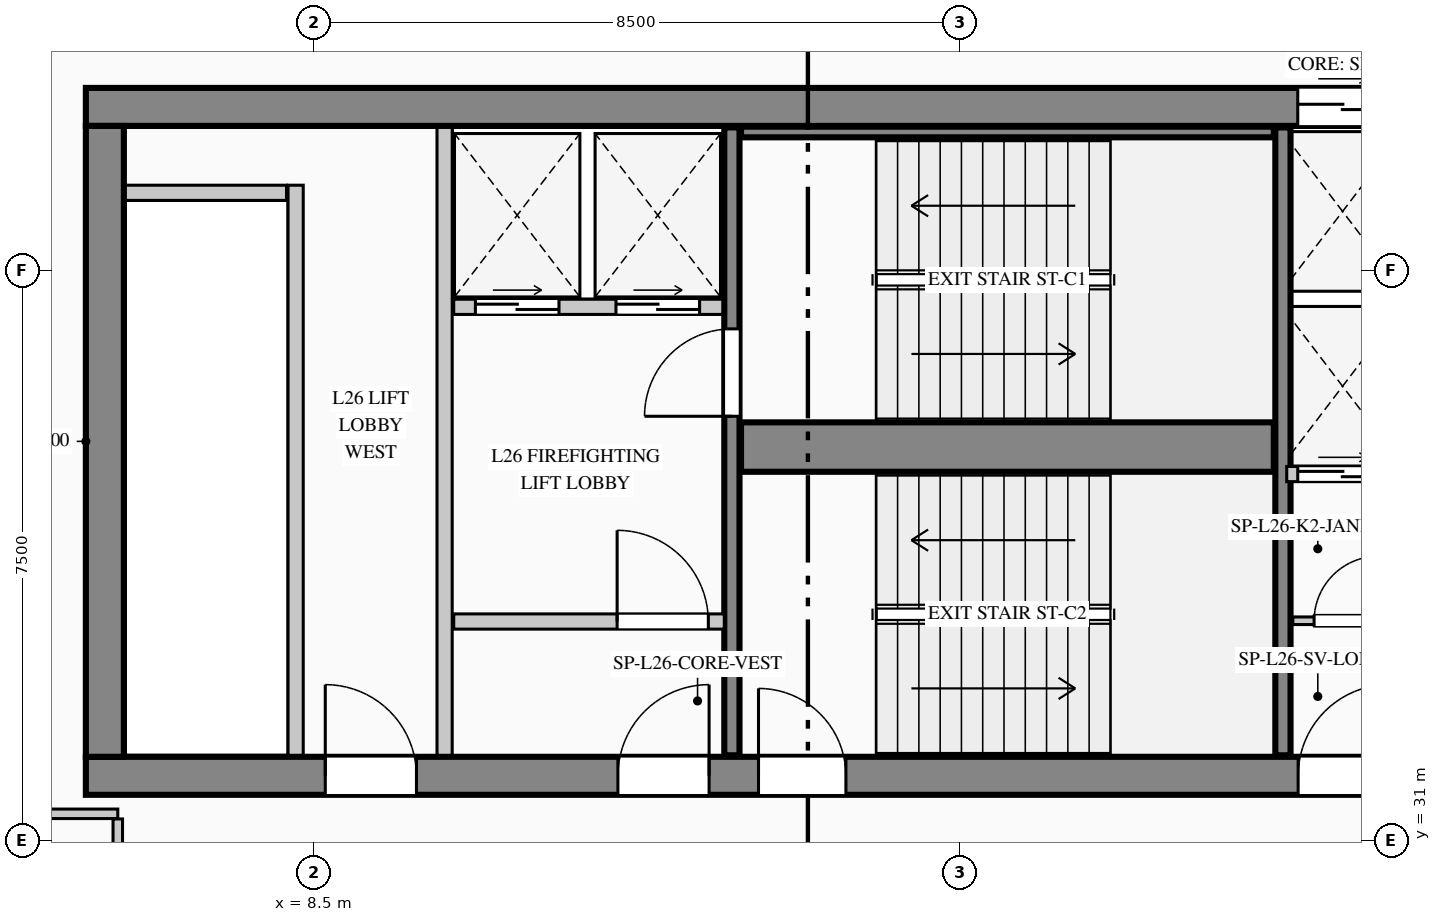
"""IFC4 building model, lengths in metres.
Left out: names, types, materials, properties, quantities, classifications, styles, units other than length and angle.
Written with IfcOpenShell. Run it as: python <this file> out.ifc"""

import sys

from ifc_helpers import new_model, si_unit, direction, frame, frame_2d, origin, place, context, subcontext, project, spatial, rectangle, extrude, element, fill, save


model = new_model("IFC4")
c1 = context("Model", 3, precision=1e-05, world=origin(), true_north=direction((0.0, 1.0)))
c2 = subcontext(c1, "Body", "Model", "MODEL_VIEW")
j1 = project(units=[si_unit("LENGTHUNIT", "METRE"), si_unit("PLANEANGLEUNIT", "RADIAN")], contexts=[c1])
p1 = place(None, origin())
s1 = spatial("IfcSite", under=j1, at=p1, CompositionType="ELEMENT")
p2 = place(p1, origin())
s2 = spatial("IfcBuilding", under=s1, at=p2, CompositionType="ELEMENT")
p3 = place(p2, frame((0.0, 0.0, 115.35)))
s3 = spatial("IfcBuildingStorey", under=s2, at=p3, CompositionType="ELEMENT", Elevation=115.35)
p4 = place(p3, frame((5.5, 40.65, 0.0), z_axis=(0.0, 0.0, 1.0), x_axis=(1.0, 0.0, 0.0)))
e1 = element("IfcWall", 1, at=p4, inside=s3, PredefinedType="SHEAR", context=c2, shape_type="SweptSolid", body=[
    extrude(rectangle(XDim=17.85, YDim=0.5, at=frame_2d((8.925, 0.0))), origin(), (0.0, 0.0, 1.0), 3.95),
])
p5 = place(p4, frame((15.945, 0.0, 0.0)))
e2 = element("IfcOpeningElement", 2, at=p5, cuts=e1, PredefinedType="OPENING", context=c2, shape_type="SweptSolid", body=[
    extrude(rectangle(XDim=1.18, YDim=2.25, at=frame_2d((0.59, 1.125))), frame((0.0, 0.26, 0.0), z_axis=(0.0, -1.0, 0.0), x_axis=(1.0, 0.0, 0.0)), (0.0, 0.0, 1.0), 0.52),
])
p6 = place(p3, frame((5.5, 31.85, 0.0), z_axis=(0.0, 0.0, 1.0), x_axis=(1.0, 0.0, 0.0)))
e3 = element("IfcWall", 3, at=p6, inside=s3, PredefinedType="SHEAR", context=c2, shape_type="SweptSolid", body=[
    extrude(rectangle(XDim=17.85, YDim=0.5, at=frame_2d((8.925, 0.0))), origin(), (0.0, 0.0, 1.0), 3.95),
])
p7 = place(p6, frame((3.15, 0.0, 0.0)))
e4 = element("IfcOpeningElement", 4, at=p7, cuts=e3, PredefinedType="OPENING", context=c2, shape_type="SweptSolid", body=[
    extrude(rectangle(XDim=1.2, YDim=2.2, at=frame_2d((0.6, 1.1))), frame((0.0, 0.26, 0.0), z_axis=(0.0, -1.0, 0.0), x_axis=(1.0, 0.0, 0.0)), (0.0, 0.0, 1.0), 0.52),
])
p8 = place(p6, frame((7.0, 0.0, 0.0)))
e5 = element("IfcOpeningElement", 5, at=p8, cuts=e3, PredefinedType="OPENING", context=c2, shape_type="SweptSolid", body=[
    extrude(rectangle(XDim=1.2, YDim=2.2, at=frame_2d((0.6, 1.1))), frame((0.0, 0.26, 0.0), z_axis=(0.0, -1.0, 0.0), x_axis=(1.0, 0.0, 0.0)), (0.0, 0.0, 1.0), 0.52),
])
p9 = place(p6, frame((8.85, 0.0, 0.0)))
e6 = element("IfcOpeningElement", 6, at=p9, cuts=e3, PredefinedType="OPENING", context=c2, shape_type="SweptSolid", body=[
    extrude(rectangle(XDim=1.15, YDim=2.2, at=frame_2d((0.575, 1.1))), frame((0.0, 0.26, 0.0), z_axis=(0.0, -1.0, 0.0), x_axis=(1.0, 0.0, 0.0)), (0.0, 0.0, 1.0), 0.52),
])
p10 = place(p6, frame((15.95, 0.0, 0.0)))
e7 = element("IfcOpeningElement", 7, at=p10, cuts=e3, PredefinedType="OPENING", context=c2, shape_type="SweptSolid", body=[
    extrude(rectangle(XDim=1.2, YDim=2.2, at=frame_2d((0.6, 1.1))), frame((0.0, 0.26, 0.0), z_axis=(0.0, -1.0, 0.0), x_axis=(1.0, 0.0, 0.0)), (0.0, 0.0, 1.0), 0.52),
])
p11 = place(p3, frame((5.75, 32.1, 0.0), z_axis=(0.0, 0.0, 1.0), x_axis=(0.0, 1.0, 0.0)))
e8 = element("IfcWall", 8, at=p11, inside=s3, PredefinedType="SHEAR", context=c2, shape_type="SweptSolid", body=[
    extrude(rectangle(XDim=8.3, YDim=0.5, at=frame_2d((4.15, 0.0))), origin(), (0.0, 0.0, 1.0), 3.95),
])
p12 = place(p3, frame((14.0, 32.12, 0.0), z_axis=(0.0, 0.0, 1.0), x_axis=(0.0, 1.0, 0.0)))
e9 = element("IfcWall", 9, at=p12, inside=s3, PredefinedType="SHEAR", context=c2, shape_type="SweptSolid", body=[
    extrude(rectangle(XDim=8.26, YDim=0.2, at=frame_2d((4.13, 0.0))), origin(), (0.0, 0.0, 1.0), 3.95),
])
p13 = place(p12, frame((4.46, 0.0, 0.0)))
e10 = element("IfcOpeningElement", 10, at=p13, cuts=e9, PredefinedType="OPENING", context=c2, shape_type="SweptSolid", body=[
    extrude(rectangle(XDim=1.15, YDim=2.2, at=frame_2d((0.575, 1.1))), frame((0.0, 0.11, 0.0), z_axis=(0.0, -1.0, 0.0), x_axis=(1.0, 0.0, 0.0)), (0.0, 0.0, 1.0), 0.22),
])
p14 = place(p3, frame((14.12, 36.175, 0.0), z_axis=(0.0, 0.0, 1.0), x_axis=(1.0, 0.0, 0.0)))
e11 = element("IfcWall", 11, at=p14, inside=s3, PredefinedType="SHEAR", context=c2, shape_type="SweptSolid", body=[
    extrude(rectangle(XDim=7.01, YDim=0.65, at=frame_2d((3.505, 0.0))), origin(), (0.0, 0.0, 1.0), 3.95),
])
p15 = place(p3, frame((21.25, 32.12, 0.0), z_axis=(0.0, 0.0, 1.0), x_axis=(0.0, 1.0, 0.0)))
e12 = element("IfcWall", 12, at=p15, inside=s3, PredefinedType="SHEAR", context=c2, shape_type="SweptSolid", body=[
    extrude(rectangle(XDim=8.26, YDim=0.2, at=frame_2d((4.13, 0.0))), origin(), (0.0, 0.0, 1.0), 3.95),
])
p16 = place(p3, frame((14.12, 40.32, 0.0), z_axis=(0.0, 0.0, 1.0), x_axis=(1.0, 0.0, 0.0)))
e13 = element("IfcWall", 13, at=p16, inside=s3, PredefinedType="SHEAR", context=c2, shape_type="SweptSolid", body=[
    extrude(rectangle(XDim=7.01, YDim=0.14, at=frame_2d((3.505, 0.0))), origin(), (0.0, 0.0, 1.0), 3.95),
])
p17 = place(p3, frame((7.993, 4.73, 0.0), z_axis=(0.0, 0.0, 1.0), x_axis=(-0.136989009016, 0.990572567462, 0.0)))
e14 = element("IfcWall", 14, at=p17, inside=s3, PredefinedType="STANDARD", context=c2, shape_type="SweptSolid", body=[
    extrude(rectangle(XDim=36.888, YDim=0.26, at=frame_2d((18.444, 0.0))), origin(), (0.0, 0.0, 1.0), 3.69),
])
p18 = place(p17, frame((19.839, 0.0, 0.9)))
e15 = element("IfcOpeningElement", 15, at=p18, cuts=e14, PredefinedType="OPENING", context=c2, shape_type="SweptSolid", body=[
    extrude(rectangle(XDim=2.1, YDim=2.0, at=frame_2d((1.05, 1.0))), frame((0.0, 0.14, 0.0), z_axis=(0.0, -1.0, 0.0), x_axis=(1.0, 0.0, 0.0)), (0.0, 0.0, 1.0), 0.28),
])
p19 = place(p3, frame((8.26, 32.12, 0.0), z_axis=(0.0, 0.0, 1.0), x_axis=(0.0, 1.0, 0.0)))
e16 = element("IfcWall", 16, at=p19, inside=s3, PredefinedType="PARTITIONING", context=c2, shape_type="SweptSolid", body=[
    extrude(rectangle(XDim=7.5, YDim=0.2, at=frame_2d((3.75, 0.0))), origin(), (0.0, 0.0, 1.0), 3.69),
])
p20 = place(p3, frame((6.02, 39.52, 0.0), z_axis=(0.0, 0.0, 1.0), x_axis=(1.0, 0.0, 0.0)))
e17 = element("IfcWall", 17, at=p20, inside=s3, PredefinedType="PARTITIONING", context=c2, shape_type="SweptSolid", body=[
    extrude(rectangle(XDim=2.12, YDim=0.2, at=frame_2d((1.06, 0.0))), origin(), (0.0, 0.0, 1.0), 3.69),
])
p21 = place(p3, frame((10.22, 32.12, 0.0), z_axis=(0.0, 0.0, 1.0), x_axis=(0.0, 1.0, 0.0)))
e18 = element("IfcWall", 18, at=p21, inside=s3, PredefinedType="PARTITIONING", context=c2, shape_type="SweptSolid", body=[
    extrude(rectangle(XDim=8.26, YDim=0.2, at=frame_2d((4.13, 0.0))), origin(), (0.0, 0.0, 1.0), 3.69),
])
p22 = place(p3, frame((10.34, 38.02, 0.0), z_axis=(0.0, 0.0, 1.0), x_axis=(1.0, 0.0, 0.0)))
e19 = element("IfcWall", 19, at=p22, inside=s3, PredefinedType="PARTITIONING", context=c2, shape_type="SweptSolid", body=[
    extrude(rectangle(XDim=3.54, YDim=0.2, at=frame_2d((1.77, 0.0))), origin(), (0.0, 0.0, 1.0), 3.69),
])
p23 = place(p22, frame((0.285, 0.0, 0.0)))
e20 = element("IfcOpeningElement", 20, at=p23, cuts=e19, PredefinedType="OPENING", context=c2, shape_type="SweptSolid", body=[
    extrude(rectangle(XDim=1.1, YDim=2.2, at=frame_2d((0.55, 1.1))), frame((0.0, 0.11, 0.0), z_axis=(0.0, -1.0, 0.0), x_axis=(1.0, 0.0, 0.0)), (0.0, 0.0, 1.0), 0.22),
])
p24 = place(p22, frame((2.135, 0.0, 0.0)))
e21 = element("IfcOpeningElement", 21, at=p24, cuts=e19, PredefinedType="OPENING", context=c2, shape_type="SweptSolid", body=[
    extrude(rectangle(XDim=1.1, YDim=2.2, at=frame_2d((0.55, 1.1))), frame((0.0, 0.11, 0.0), z_axis=(0.0, -1.0, 0.0), x_axis=(1.0, 0.0, 0.0)), (0.0, 0.0, 1.0), 0.22),
])
p25 = place(p3, frame((10.34, 33.88, 0.0), z_axis=(0.0, 0.0, 1.0), x_axis=(1.0, 0.0, 0.0)))
e22 = element("IfcWall", 22, at=p25, inside=s3, PredefinedType="PARTITIONING", context=c2, shape_type="SweptSolid", body=[
    extrude(rectangle(XDim=3.56, YDim=0.2, at=frame_2d((1.78, 0.0))), origin(), (0.0, 0.0, 1.0), 3.69),
])
p26 = place(p25, frame((2.15, 0.0, 0.0)))
e23 = element("IfcOpeningElement", 23, at=p26, cuts=e22, PredefinedType="OPENING", context=c2, shape_type="SweptSolid", body=[
    extrude(rectangle(XDim=1.2, YDim=2.2, at=frame_2d((0.6, 1.1))), frame((0.0, 0.11, 0.0), z_axis=(0.0, -1.0, 0.0), x_axis=(1.0, 0.0, 0.0)), (0.0, 0.0, 1.0), 0.22),
])
p27 = place(p3, frame((21.38, 33.89, 0.0), z_axis=(0.0, 0.0, 1.0), x_axis=(1.0, 0.0, 0.0)))
e24 = element("IfcWall", 24, at=p27, inside=s3, PredefinedType="PARTITIONING", context=c2, shape_type="SweptSolid", body=[
    extrude(rectangle(XDim=1.42, YDim=0.1, at=frame_2d((0.71, 0.0))), origin(), (0.0, 0.0, 1.0), 3.69),
])
p28 = place(p27, frame((0.28, 0.0, 0.0)))
e25 = element("IfcOpeningElement", 25, at=p28, cuts=e24, PredefinedType="OPENING", context=c2, shape_type="SweptSolid", body=[
    extrude(rectangle(XDim=0.85, YDim=2.1, at=frame_2d((0.425, 1.05))), frame((0.0, 0.06, 0.0), z_axis=(0.0, -1.0, 0.0), x_axis=(1.0, 0.0, 0.0)), (0.0, 0.0, 1.0), 0.12),
])
p29 = place(p3, frame((21.3, 35.82, 0.0), z_axis=(0.0, 0.0, 1.0), x_axis=(1.0, 0.0, 0.0)))
e26 = element("IfcWall", 26, at=p29, inside=s3, PredefinedType="PARTITIONING", context=c2, shape_type="SweptSolid", body=[
    extrude(rectangle(XDim=1.5, YDim=0.2, at=frame_2d((0.75, 0.0))), origin(), (0.0, 0.0, 1.0), 3.69),
])
p30 = place(p29, frame((0.145, 0.0, 0.0)))
e27 = element("IfcOpeningElement", 27, at=p30, cuts=e26, PredefinedType="OPENING", context=c2, shape_type="SweptSolid", body=[
    extrude(rectangle(XDim=1.18, YDim=2.25, at=frame_2d((0.59, 1.125))), frame((0.0, 0.11, 0.0), z_axis=(0.0, -1.0, 0.0), x_axis=(1.0, 0.0, 0.0)), (0.0, 0.0, 1.0), 0.22),
])
p31 = place(p3, frame((4.448, 31.35, 0.0), z_axis=(0.0, 0.0, 1.0), x_axis=(1.0, 0.0, 0.0)))
e28 = element("IfcWall", 28, at=p31, inside=s3, PredefinedType="PARTITIONING", context=c2, shape_type="SweptSolid", body=[
    extrude(rectangle(XDim=1.472, YDim=0.125, at=frame_2d((0.736, 0.0))), origin(), (0.0, 0.0, 1.0), 3.69),
])
p32 = place(p3, frame((5.92, 31.282, 0.0), z_axis=(0.0, 0.0, 1.0), x_axis=(0.0, -1.0, 0.0)))
e29 = element("IfcWall", 29, at=p32, inside=s3, PredefinedType="PARTITIONING", context=c2, shape_type="SweptSolid", body=[
    extrude(rectangle(XDim=2.682, YDim=0.125, at=frame_2d((1.341, 0.0))), origin(), (0.0, 0.0, 1.0), 3.69),
])
p33 = place(p7, origin())
e30 = element("IfcDoor", 30, at=p33, inside=s3, OperationType="SINGLE_SWING_LEFT", PredefinedType="DOOR", context=c2, shape_type="SweptSolid", body=[
    extrude(rectangle(XDim=1.2, YDim=2.2, at=frame_2d((0.6, 1.1))), frame((0.0, 0.025, 0.0), z_axis=(0.0, -1.0, 0.0), x_axis=(1.0, 0.0, 0.0)), (0.0, 0.0, 1.0), 0.05),
])
fill(e4, e30)
p34 = place(p8, origin())
e31 = element("IfcDoor", 31, at=p34, inside=s3, OperationType="SINGLE_SWING_RIGHT", PredefinedType="DOOR", context=c2, shape_type="SweptSolid", body=[
    extrude(rectangle(XDim=1.2, YDim=2.2, at=frame_2d((0.6, 1.1))), frame((0.0, 0.025, 0.0), z_axis=(0.0, -1.0, 0.0), x_axis=(1.0, 0.0, 0.0)), (0.0, 0.0, 1.0), 0.05),
])
fill(e5, e31)
p35 = place(p9, origin())
e32 = element("IfcDoor", 32, at=p35, inside=s3, OperationType="SINGLE_SWING_LEFT", PredefinedType="DOOR", context=c2, shape_type="SweptSolid", body=[
    extrude(rectangle(XDim=1.15, YDim=2.2, at=frame_2d((0.575, 1.1))), frame((0.0, 0.025, 0.0), z_axis=(0.0, -1.0, 0.0), x_axis=(1.0, 0.0, 0.0)), (0.0, 0.0, 1.0), 0.05),
])
fill(e6, e32)
p36 = place(p10, origin())
e33 = element("IfcDoor", 33, at=p36, inside=s3, OperationType="SINGLE_SWING_RIGHT", PredefinedType="DOOR", context=c2, shape_type="SweptSolid", body=[
    extrude(rectangle(XDim=1.2, YDim=2.2, at=frame_2d((0.6, 1.1))), frame((0.0, 0.025, 0.0), z_axis=(0.0, -1.0, 0.0), x_axis=(1.0, 0.0, 0.0)), (0.0, 0.0, 1.0), 0.05),
])
fill(e7, e33)
p37 = place(p26, origin())
e34 = element("IfcDoor", 34, at=p37, inside=s3, OperationType="SINGLE_SWING_LEFT", PredefinedType="DOOR", context=c2, shape_type="SweptSolid", body=[
    extrude(rectangle(XDim=1.2, YDim=2.2, at=frame_2d((0.6, 1.1))), frame((0.0, 0.025, 0.0), z_axis=(0.0, -1.0, 0.0), x_axis=(1.0, 0.0, 0.0)), (0.0, 0.0, 1.0), 0.05),
])
fill(e23, e34)
p38 = place(p28, origin())
e35 = element("IfcDoor", 35, at=p38, inside=s3, OperationType="SINGLE_SWING_RIGHT", PredefinedType="DOOR", context=c2, shape_type="SweptSolid", body=[
    extrude(rectangle(XDim=0.85, YDim=2.1, at=frame_2d((0.425, 1.05))), frame((0.0, 0.025, 0.0), z_axis=(0.0, -1.0, 0.0), x_axis=(1.0, 0.0, 0.0)), (0.0, 0.0, 1.0), 0.05),
])
fill(e25, e35)
p39 = place(p13, origin())
e36 = element("IfcDoor", 36, at=p39, inside=s3, OperationType="SINGLE_SWING_LEFT", PredefinedType="DOOR", context=c2, shape_type="SweptSolid", body=[
    extrude(rectangle(XDim=1.15, YDim=2.2, at=frame_2d((0.575, 1.1))), frame((0.0, 0.025, 0.0), z_axis=(0.0, -1.0, 0.0), x_axis=(1.0, 0.0, 0.0)), (0.0, 0.0, 1.0), 0.05),
])
fill(e10, e36)
p40 = place(p23, origin())
e37 = element("IfcDoor", 37, at=p40, inside=s3, OperationType="DOUBLE_DOOR_SLIDING", PredefinedType="DOOR", context=c2, shape_type="SweptSolid", body=[
    extrude(rectangle(XDim=1.1, YDim=2.2, at=frame_2d((0.55, 1.1))), frame((0.0, 0.025, 0.0), z_axis=(0.0, -1.0, 0.0), x_axis=(1.0, 0.0, 0.0)), (0.0, 0.0, 1.0), 0.05),
])
fill(e20, e37)
p41 = place(p24, origin())
e38 = element("IfcDoor", 38, at=p41, inside=s3, OperationType="DOUBLE_DOOR_SLIDING", PredefinedType="DOOR", context=c2, shape_type="SweptSolid", body=[
    extrude(rectangle(XDim=1.1, YDim=2.2, at=frame_2d((0.55, 1.1))), frame((0.0, 0.025, 0.0), z_axis=(0.0, -1.0, 0.0), x_axis=(1.0, 0.0, 0.0)), (0.0, 0.0, 1.0), 0.05),
])
fill(e21, e38)
p42 = place(p5, origin())
e39 = element("IfcDoor", 39, at=p42, inside=s3, OperationType="DOUBLE_DOOR_SLIDING", PredefinedType="DOOR", context=c2, shape_type="SweptSolid", body=[
    extrude(rectangle(XDim=1.18, YDim=2.25, at=frame_2d((0.59, 1.125))), frame((0.0, 0.025, 0.0), z_axis=(0.0, -1.0, 0.0), x_axis=(1.0, 0.0, 0.0)), (0.0, 0.0, 1.0), 0.05),
])
fill(e2, e39)
p43 = place(p30, origin())
e40 = element("IfcDoor", 40, at=p43, inside=s3, OperationType="DOUBLE_DOOR_SLIDING", PredefinedType="DOOR", context=c2, shape_type="SweptSolid", body=[
    extrude(rectangle(XDim=1.18, YDim=2.25, at=frame_2d((0.59, 1.125))), frame((0.0, 0.025, 0.0), z_axis=(0.0, -1.0, 0.0), x_axis=(1.0, 0.0, 0.0)), (0.0, 0.0, 1.0), 0.05),
])
fill(e27, e40)
save(model, sys.argv[1])
